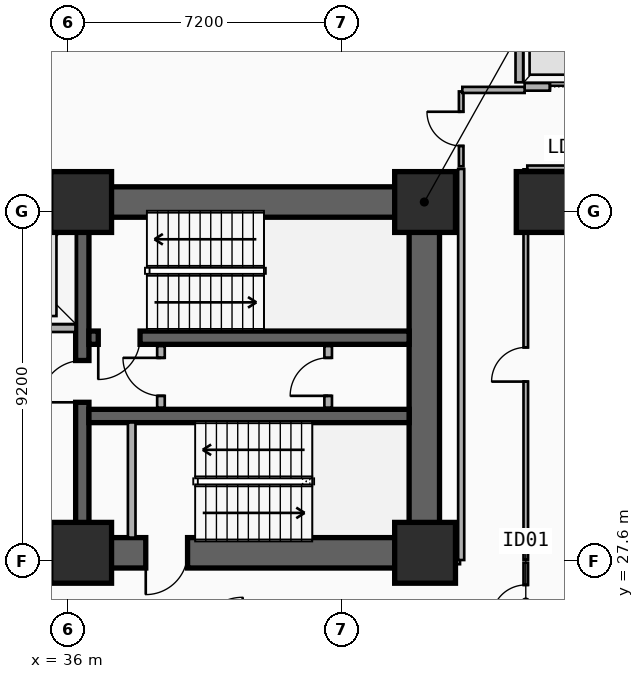
"""IFC4 building model, lengths in metres.
Left out: names, types, materials, properties, quantities, classifications, styles, units other than length and angle.
Written with IfcOpenShell. Run it as: python <this file> out.ifc"""

import sys

from ifc_helpers import new_model, si_unit, direction, frame, frame_2d, origin, origin_2d, place, context, subcontext, project, spatial, rectangle, extrude, element, fill, save


model = new_model("IFC4")
c1 = context("Model", 3, precision=1e-05, world=origin(), true_north=direction((0.0, 1.0)))
c2 = subcontext(c1, "Body", "Model", "MODEL_VIEW")
j1 = project(units=[si_unit("LENGTHUNIT", "METRE"), si_unit("PLANEANGLEUNIT", "RADIAN")], contexts=[c1])
p1 = place(None, origin())
s1 = spatial("IfcSite", under=j1, at=p1, CompositionType="ELEMENT")
p2 = place(p1, origin())
s2 = spatial("IfcBuilding", under=s1, at=p2, CompositionType="ELEMENT")
p3 = place(p2, frame((0.0, 0.0, -8.8)))
s3 = spatial("IfcBuildingStorey", under=s2, at=p3, CompositionType="ELEMENT", Elevation=-8.8)
p4 = place(p3, frame((12.15, 37.05, 0.0), z_axis=(0.0, 0.0, 1.0), x_axis=(1.0, 0.0, 0.0)))
e1 = element("IfcWall", 1, at=p4, inside=s3, PredefinedType="SHEAR", context=c2, shape_type="SweptSolid", body=[
    extrude(rectangle(XDim=33.23, YDim=0.8, at=frame_2d((16.615, 0.0))), origin(), (0.0, 0.0, 1.0), 4.4),
])
p5 = place(p3, frame((45.38, 27.82, 0.0), z_axis=(0.0, 0.0, 1.0), x_axis=(-1.0, 0.0, 0.0)))
e2 = element("IfcWall", 2, at=p5, inside=s3, PredefinedType="SHEAR", context=c2, shape_type="SweptSolid", body=[
    extrude(rectangle(XDim=12.23, YDim=0.8, at=frame_2d((6.115, 0.0))), origin(), (0.0, 0.0, 1.0), 4.4),
])
p6 = place(p5, frame((9.93, 0.0, 0.0)))
e3 = element("IfcOpeningElement", 3, at=p6, cuts=e2, PredefinedType="OPENING", context=c2, shape_type="SweptSolid", body=[
    extrude(rectangle(XDim=1.1, YDim=2.15, at=frame_2d((0.55, 1.075))), frame((0.0, 0.41, 0.0), z_axis=(0.0, -1.0, 0.0), x_axis=(1.0, 0.0, 0.0)), (0.0, 0.0, 1.0), 0.82),
])
p7 = place(p5, frame((6.23, 0.0, 0.0)))
e4 = element("IfcOpeningElement", 4, at=p7, cuts=e2, PredefinedType="OPENING", context=c2, shape_type="SweptSolid", body=[
    extrude(rectangle(XDim=1.1, YDim=2.15, at=frame_2d((0.55, 1.075))), frame((0.0, 0.41, 0.0), z_axis=(0.0, -1.0, 0.0), x_axis=(1.0, 0.0, 0.0)), (0.0, 0.0, 1.0), 0.82),
])
p8 = place(p3, frame((45.38, 28.22, 0.0), z_axis=(0.0, 0.0, 1.0), x_axis=(0.0, 1.0, 0.0)))
e5 = element("IfcWall", 5, at=p8, inside=s3, PredefinedType="SHEAR", context=c2, shape_type="SweptSolid", body=[
    extrude(rectangle(XDim=8.43, YDim=0.8, at=frame_2d((4.215, 0.0))), origin(), (0.0, 0.0, 1.0), 4.4),
])
p9 = place(p3, frame((36.38, 28.22, 0.0), z_axis=(0.0, 0.0, 1.0), x_axis=(0.0, 1.0, 0.0)))
e6 = element("IfcWall", 6, at=p9, inside=s3, PredefinedType="SHEAR", context=c2, shape_type="SweptSolid", body=[
    extrude(rectangle(XDim=8.43, YDim=0.35, at=frame_2d((4.215, 0.0))), origin(), (0.0, 0.0, 1.0), 4.4),
])
p10 = place(p9, frame((3.56, 0.0, 0.0)))
e7 = element("IfcOpeningElement", 7, at=p10, cuts=e6, PredefinedType="OPENING", context=c2, shape_type="SweptSolid", body=[
    extrude(rectangle(XDim=1.1, YDim=2.15, at=frame_2d((0.55, 1.075))), frame((0.0, 0.185, 0.0), z_axis=(0.0, -1.0, 0.0), x_axis=(1.0, 0.0, 0.0)), (0.0, 0.0, 1.0), 0.37),
])
p11 = place(p3, frame((44.98, 33.48, 0.0), z_axis=(0.0, 0.0, 1.0), x_axis=(-1.0, 0.0, 0.0)))
e8 = element("IfcWall", 8, at=p11, inside=s3, PredefinedType="SHEAR", context=c2, shape_type="SweptSolid", body=[
    extrude(rectangle(XDim=8.425, YDim=0.35, at=frame_2d((4.212, 0.0))), origin(), (0.0, 0.0, 1.0), 4.4),
])
p12 = place(p11, frame((7.08, 0.0, 0.0)))
e9 = element("IfcOpeningElement", 9, at=p12, cuts=e8, PredefinedType="OPENING", context=c2, shape_type="SweptSolid", body=[
    extrude(rectangle(XDim=1.1, YDim=2.15, at=frame_2d((0.55, 1.075))), frame((0.0, 0.185, 0.0), z_axis=(0.0, -1.0, 0.0), x_axis=(1.0, 0.0, 0.0)), (0.0, 0.0, 1.0), 0.37),
])
p13 = place(p3, frame((36.555, 31.42, 0.0), z_axis=(0.0, 0.0, 1.0), x_axis=(1.0, 0.0, 0.0)))
e10 = element("IfcWall", 10, at=p13, inside=s3, PredefinedType="SHEAR", context=c2, shape_type="SweptSolid", body=[
    extrude(rectangle(XDim=8.425, YDim=0.35, at=frame_2d((4.212, 0.0))), origin(), (0.0, 0.0, 1.0), 4.4),
])
for number, where, z_axis, x_axis in (
    (11, (36.35, 27.82, 0.0), (0.0, 0.0, 1.0), (1.0, 0.0, 0.0)),
    (12, (36.35, 37.05, 0.0), (0.0, 0.0, 1.0), (1.0, 0.0, 0.0)),
    (13, (45.4, 27.82, 0.0), (0.0, 0.0, 1.0), (1.0, 0.0, 0.0)),
    (14, (45.4, 37.05, 0.0), (0.0, 0.0, 1.0), (1.0, 0.0, 0.0)),
    (15, (48.6, 37.05, 0.0), (0.0, 0.0, 1.0), (1.0, 0.0, 0.0)),
):
    element("IfcColumn", number, at=place(p3, frame(where, z_axis=z_axis, x_axis=x_axis)), inside=s3, PredefinedType="COLUMN", context=c2, shape_type="SweptSolid", body=[
        extrude(rectangle(XDim=1.6, YDim=1.6, at=origin_2d()), origin(), (0.0, 0.0, 1.0), 4.4),
    ])
p14 = place(p3, frame((33.475, 33.73, 0.0), z_axis=(0.0, 0.0, 1.0), x_axis=(1.0, 0.0, 0.0)))
e16 = element("IfcWall", 16, at=p14, inside=s3, PredefinedType="PARTITIONING", context=c2, shape_type="SweptSolid", body=[
    extrude(rectangle(XDim=2.725, YDim=0.2, at=frame_2d((1.362, 0.0))), origin(), (0.0, 0.0, 1.0), 3.052),
])
p15 = place(p14, frame((0.812, 0.0, 0.0)))
e17 = element("IfcOpeningElement", 17, at=p15, cuts=e16, PredefinedType="OPENING", context=c2, shape_type="SweptSolid", body=[
    extrude(rectangle(XDim=1.1, YDim=2.15, at=frame_2d((0.55, 1.075))), frame((0.0, 0.11, 0.0), z_axis=(0.0, -1.0, 0.0), x_axis=(1.0, 0.0, 0.0)), (0.0, 0.0, 1.0), 0.22),
])
p16 = place(p3, frame((48.02, 40.08, 0.0), z_axis=(0.0, 0.0, 1.0), x_axis=(1.0, 0.0, 0.0)))
e18 = element("IfcWall", 18, at=p16, inside=s3, PredefinedType="PARTITIONING", context=c2, shape_type="SweptSolid", body=[
    extrude(rectangle(XDim=2.43, YDim=0.2, at=frame_2d((1.215, 0.0))), origin(), (0.0, 0.0, 1.0), 4.08),
])
p17 = place(p16, frame((0.665, 0.0, 0.0)))
e19 = element("IfcOpeningElement", 19, at=p17, cuts=e18, PredefinedType="OPENING", context=c2, shape_type="SweptSolid", body=[
    extrude(rectangle(XDim=1.1, YDim=2.15, at=frame_2d((0.55, 1.075))), frame((0.0, 0.11, 0.0), z_axis=(0.0, -1.0, 0.0), x_axis=(1.0, 0.0, 0.0)), (0.0, 0.0, 1.0), 0.22),
])
p18 = place(p3, frame((47.88, 40.2, 0.0), z_axis=(0.0, 0.0, 1.0), x_axis=(0.0, 1.0, 0.0)))
e20 = element("IfcWall", 20, at=p18, inside=s3, PredefinedType="PARTITIONING", context=c2, shape_type="SweptSolid", body=[
    extrude(rectangle(XDim=2.6, YDim=0.2, at=frame_2d((1.3, 0.0))), origin(), (0.0, 0.0, 1.0), 4.08),
])
p19 = place(p3, frame((37.68, 28.22, 0.0), z_axis=(0.0, 0.0, 1.0), x_axis=(0.0, 1.0, 0.0)))
e21 = element("IfcWall", 21, at=p19, inside=s3, PredefinedType="PARTITIONING", context=c2, shape_type="SweptSolid", body=[
    extrude(rectangle(XDim=3.03, YDim=0.2, at=frame_2d((1.515, 0.0))), origin(), (0.0, 0.0, 1.0), 4.08),
])
p20 = place(p3, frame((38.45, 31.64, 0.0), z_axis=(0.0, 0.0, 1.0), x_axis=(0.0, 1.0, 0.0)))
e22 = element("IfcWall", 22, at=p20, inside=s3, PredefinedType="PARTITIONING", context=c2, shape_type="SweptSolid", body=[
    extrude(rectangle(XDim=1.62, YDim=0.2, at=frame_2d((0.81, 0.0))), origin(), (0.0, 0.0, 1.0), 4.08),
])
p21 = place(p20, frame((0.31, 0.0, 0.0)))
e23 = element("IfcOpeningElement", 23, at=p21, cuts=e22, PredefinedType="OPENING", context=c2, shape_type="SweptSolid", body=[
    extrude(rectangle(XDim=1.0, YDim=2.15, at=frame_2d((0.5, 1.075))), frame((0.0, 0.11, 0.0), z_axis=(0.0, -1.0, 0.0), x_axis=(1.0, 0.0, 0.0)), (0.0, 0.0, 1.0), 0.22),
])
p22 = place(p3, frame((42.85, 31.64, 0.0), z_axis=(0.0, 0.0, 1.0), x_axis=(0.0, 1.0, 0.0)))
e24 = element("IfcWall", 24, at=p22, inside=s3, PredefinedType="PARTITIONING", context=c2, shape_type="SweptSolid", body=[
    extrude(rectangle(XDim=1.62, YDim=0.2, at=frame_2d((0.81, 0.0))), origin(), (0.0, 0.0, 1.0), 4.08),
])
p23 = place(p22, frame((0.31, 0.0, 0.0)))
e25 = element("IfcOpeningElement", 25, at=p23, cuts=e24, PredefinedType="OPENING", context=c2, shape_type="SweptSolid", body=[
    extrude(rectangle(XDim=1.0, YDim=2.15, at=frame_2d((0.5, 1.075))), frame((0.0, 0.11, 0.0), z_axis=(0.0, -1.0, 0.0), x_axis=(1.0, 0.0, 0.0)), (0.0, 0.0, 1.0), 0.22),
])
p24 = place(p3, frame((48.05, 25.49, 0.0), z_axis=(0.0, 0.0, 1.0), x_axis=(0.0, 1.0, 0.0)))
e26 = element("IfcWall", 26, at=p24, inside=s3, PredefinedType="PARTITIONING", context=c2, shape_type="SweptSolid", body=[
    extrude(rectangle(XDim=2.07, YDim=0.12, at=frame_2d((1.035, 0.0))), origin(), (0.0, 0.0, 1.0), 4.08),
])
p25 = place(p24, frame((0.585, 0.0, 0.0)))
e27 = element("IfcOpeningElement", 27, at=p25, cuts=e26, PredefinedType="OPENING", context=c2, shape_type="SweptSolid", body=[
    extrude(rectangle(XDim=0.9, YDim=2.1, at=frame_2d((0.45, 1.05))), frame((0.0, 0.07, 0.0), z_axis=(0.0, -1.0, 0.0), x_axis=(1.0, 0.0, 0.0)), (0.0, 0.0, 1.0), 0.14),
])
p26 = place(p3, frame((48.05, 27.64, 0.0), z_axis=(0.0, 0.0, 1.0), x_axis=(0.0, 1.0, 0.0)))
e28 = element("IfcWall", 28, at=p26, inside=s3, PredefinedType="PARTITIONING", context=c2, shape_type="SweptSolid", body=[
    extrude(rectangle(XDim=10.27, YDim=0.12, at=frame_2d((5.135, 0.0))), origin(), (0.0, 0.0, 1.0), 4.08),
])
p27 = place(p26, frame((4.685, 0.0, 0.0)))
e29 = element("IfcOpeningElement", 29, at=p27, cuts=e28, PredefinedType="OPENING", context=c2, shape_type="SweptSolid", body=[
    extrude(rectangle(XDim=0.9, YDim=2.1, at=frame_2d((0.45, 1.05))), frame((0.0, 0.07, 0.0), z_axis=(0.0, -1.0, 0.0), x_axis=(1.0, 0.0, 0.0)), (0.0, 0.0, 1.0), 0.14),
])
p28 = place(p3, frame((46.35, 37.99, 0.0), z_axis=(0.0, 0.0, 1.0), x_axis=(0.0, 1.0, 0.0)))
e30 = element("IfcWall", 30, at=p28, inside=s3, PredefinedType="PARTITIONING", context=c2, shape_type="SweptSolid", body=[
    extrude(rectangle(XDim=1.97, YDim=0.12, at=frame_2d((0.985, 0.0))), origin(), (0.0, 0.0, 1.0), 4.08),
])
p29 = place(p28, frame((0.535, 0.0, 0.0)))
e31 = element("IfcOpeningElement", 31, at=p29, cuts=e30, PredefinedType="OPENING", context=c2, shape_type="SweptSolid", body=[
    extrude(rectangle(XDim=0.9, YDim=2.1, at=frame_2d((0.45, 1.05))), frame((0.0, 0.07, 0.0), z_axis=(0.0, -1.0, 0.0), x_axis=(1.0, 0.0, 0.0)), (0.0, 0.0, 1.0), 0.14),
])
p30 = place(p3, frame((48.09, 37.95, 0.0), z_axis=(0.0, 0.0, 1.0), x_axis=(1.0, 0.0, 0.0)))
e32 = element("IfcWall", 32, at=p30, inside=s3, PredefinedType="PARTITIONING", context=c2, shape_type="SweptSolid", body=[
    extrude(rectangle(XDim=5.07, YDim=0.12, at=frame_2d((2.535, 0.0))), origin(), (0.0, 0.0, 1.0), 4.08),
])
p31 = place(p30, frame((3.382, 0.0, 0.0)))
e33 = element("IfcOpeningElement", 33, at=p31, cuts=e32, PredefinedType="OPENING", context=c2, shape_type="SweptSolid", body=[
    extrude(rectangle(XDim=0.9, YDim=2.1, at=frame_2d((0.45, 1.05))), frame((0.0, 0.07, 0.0), z_axis=(0.0, -1.0, 0.0), x_axis=(1.0, 0.0, 0.0)), (0.0, 0.0, 1.0), 0.14),
])
p32 = place(p3, frame((45.41, 27.6, 0.0), z_axis=(0.0, 0.0, 1.0), x_axis=(1.0, 0.0, 0.0)))
e34 = element("IfcWall", 34, at=p32, inside=s3, PredefinedType="PARTITIONING", context=c2, shape_type="SweptSolid", body=[
    extrude(rectangle(XDim=0.91, YDim=0.16, at=frame_2d((0.455, 0.0))), origin(), (0.0, 0.0, 1.0), 3.052),
])
p33 = place(p3, frame((46.38, 40.0, 0.0), z_axis=(0.0, 0.0, 1.0), x_axis=(1.0, 0.0, 0.0)))
e35 = element("IfcWall", 35, at=p33, inside=s3, PredefinedType="PARTITIONING", context=c2, shape_type="SweptSolid", body=[
    extrude(rectangle(XDim=1.64, YDim=0.16, at=frame_2d((0.82, 0.0))), origin(), (0.0, 0.0, 1.0), 4.08),
])
p34 = place(p3, frame((46.35, 27.63, 0.0), z_axis=(0.0, 0.0, 1.0), x_axis=(0.0, 1.0, 0.0)))
e36 = element("IfcWall", 36, at=p34, inside=s3, PredefinedType="PARTITIONING", context=c2, shape_type="SweptSolid", body=[
    extrude(rectangle(XDim=10.29, YDim=0.16, at=frame_2d((5.145, 0.0))), origin(), (0.0, 0.0, 1.0), 4.08),
])
p35 = place(p17, origin())
e37 = element("IfcDoor", 37, at=p35, inside=s3, OperationType="DOUBLE_DOOR_SLIDING", PredefinedType="DOOR", context=c2, shape_type="SweptSolid", body=[
    extrude(rectangle(XDim=1.1, YDim=2.15, at=frame_2d((0.55, 1.075))), frame((0.0, 0.025, 0.0), z_axis=(0.0, -1.0, 0.0), x_axis=(1.0, 0.0, 0.0)), (0.0, 0.0, 1.0), 0.05),
])
fill(e19, e37)
p36 = place(p12, origin())
e38 = element("IfcDoor", 38, at=p36, inside=s3, OperationType="SINGLE_SWING_RIGHT", PredefinedType="DOOR", context=c2, shape_type="SweptSolid", body=[
    extrude(rectangle(XDim=1.1, YDim=2.15, at=frame_2d((0.55, 1.075))), frame((0.0, 0.025, 0.0), z_axis=(0.0, -1.0, 0.0), x_axis=(1.0, 0.0, 0.0)), (0.0, 0.0, 1.0), 0.05),
])
fill(e9, e38)
p37 = place(p10, origin())
e39 = element("IfcDoor", 39, at=p37, inside=s3, OperationType="SINGLE_SWING_LEFT", PredefinedType="DOOR", context=c2, shape_type="SweptSolid", body=[
    extrude(rectangle(XDim=1.1, YDim=2.15, at=frame_2d((0.55, 1.075))), frame((0.0, 0.025, 0.0), z_axis=(0.0, -1.0, 0.0), x_axis=(1.0, 0.0, 0.0)), (0.0, 0.0, 1.0), 0.05),
])
fill(e7, e39)
p38 = place(p7, origin())
e40 = element("IfcDoor", 40, at=p38, inside=s3, OperationType="SINGLE_SWING_RIGHT", PredefinedType="DOOR", context=c2, shape_type="SweptSolid", body=[
    extrude(rectangle(XDim=1.1, YDim=2.15, at=frame_2d((0.55, 1.075))), frame((0.0, 0.025, 0.0), z_axis=(0.0, -1.0, 0.0), x_axis=(1.0, 0.0, 0.0)), (0.0, 0.0, 1.0), 0.05),
])
fill(e4, e40)
p39 = place(p21, origin())
e41 = element("IfcDoor", 41, at=p39, inside=s3, OperationType="SINGLE_SWING_RIGHT", PredefinedType="DOOR", context=c2, shape_type="SweptSolid", body=[
    extrude(rectangle(XDim=1.0, YDim=2.15, at=frame_2d((0.5, 1.075))), frame((0.0, 0.025, 0.0), z_axis=(0.0, -1.0, 0.0), x_axis=(1.0, 0.0, 0.0)), (0.0, 0.0, 1.0), 0.05),
])
fill(e23, e41)
p40 = place(p23, origin())
e42 = element("IfcDoor", 42, at=p40, inside=s3, OperationType="SINGLE_SWING_LEFT", PredefinedType="DOOR", context=c2, shape_type="SweptSolid", body=[
    extrude(rectangle(XDim=1.0, YDim=2.15, at=frame_2d((0.5, 1.075))), frame((0.0, 0.025, 0.0), z_axis=(0.0, -1.0, 0.0), x_axis=(1.0, 0.0, 0.0)), (0.0, 0.0, 1.0), 0.05),
])
fill(e25, e42)
p41 = place(p25, origin())
e43 = element("IfcDoor", 43, at=p41, inside=s3, OperationType="SINGLE_SWING_LEFT", PredefinedType="DOOR", context=c2, shape_type="SweptSolid", body=[
    extrude(rectangle(XDim=0.9, YDim=2.1, at=frame_2d((0.45, 1.05))), frame((0.0, 0.025, 0.0), z_axis=(0.0, -1.0, 0.0), x_axis=(1.0, 0.0, 0.0)), (0.0, 0.0, 1.0), 0.05),
])
fill(e27, e43)
p42 = place(p27, origin())
e44 = element("IfcDoor", 44, at=p42, inside=s3, OperationType="SINGLE_SWING_LEFT", PredefinedType="DOOR", context=c2, shape_type="SweptSolid", body=[
    extrude(rectangle(XDim=0.9, YDim=2.1, at=frame_2d((0.45, 1.05))), frame((0.0, 0.025, 0.0), z_axis=(0.0, -1.0, 0.0), x_axis=(1.0, 0.0, 0.0)), (0.0, 0.0, 1.0), 0.05),
])
fill(e29, e44)
p43 = place(p29, origin())
e45 = element("IfcDoor", 45, at=p43, inside=s3, OperationType="SINGLE_SWING_RIGHT", PredefinedType="DOOR", context=c2, shape_type="SweptSolid", body=[
    extrude(rectangle(XDim=0.9, YDim=2.1, at=frame_2d((0.45, 1.05))), frame((0.0, 0.025, 0.0), z_axis=(0.0, -1.0, 0.0), x_axis=(1.0, 0.0, 0.0)), (0.0, 0.0, 1.0), 0.05),
])
fill(e31, e45)
save(model, sys.argv[1])
